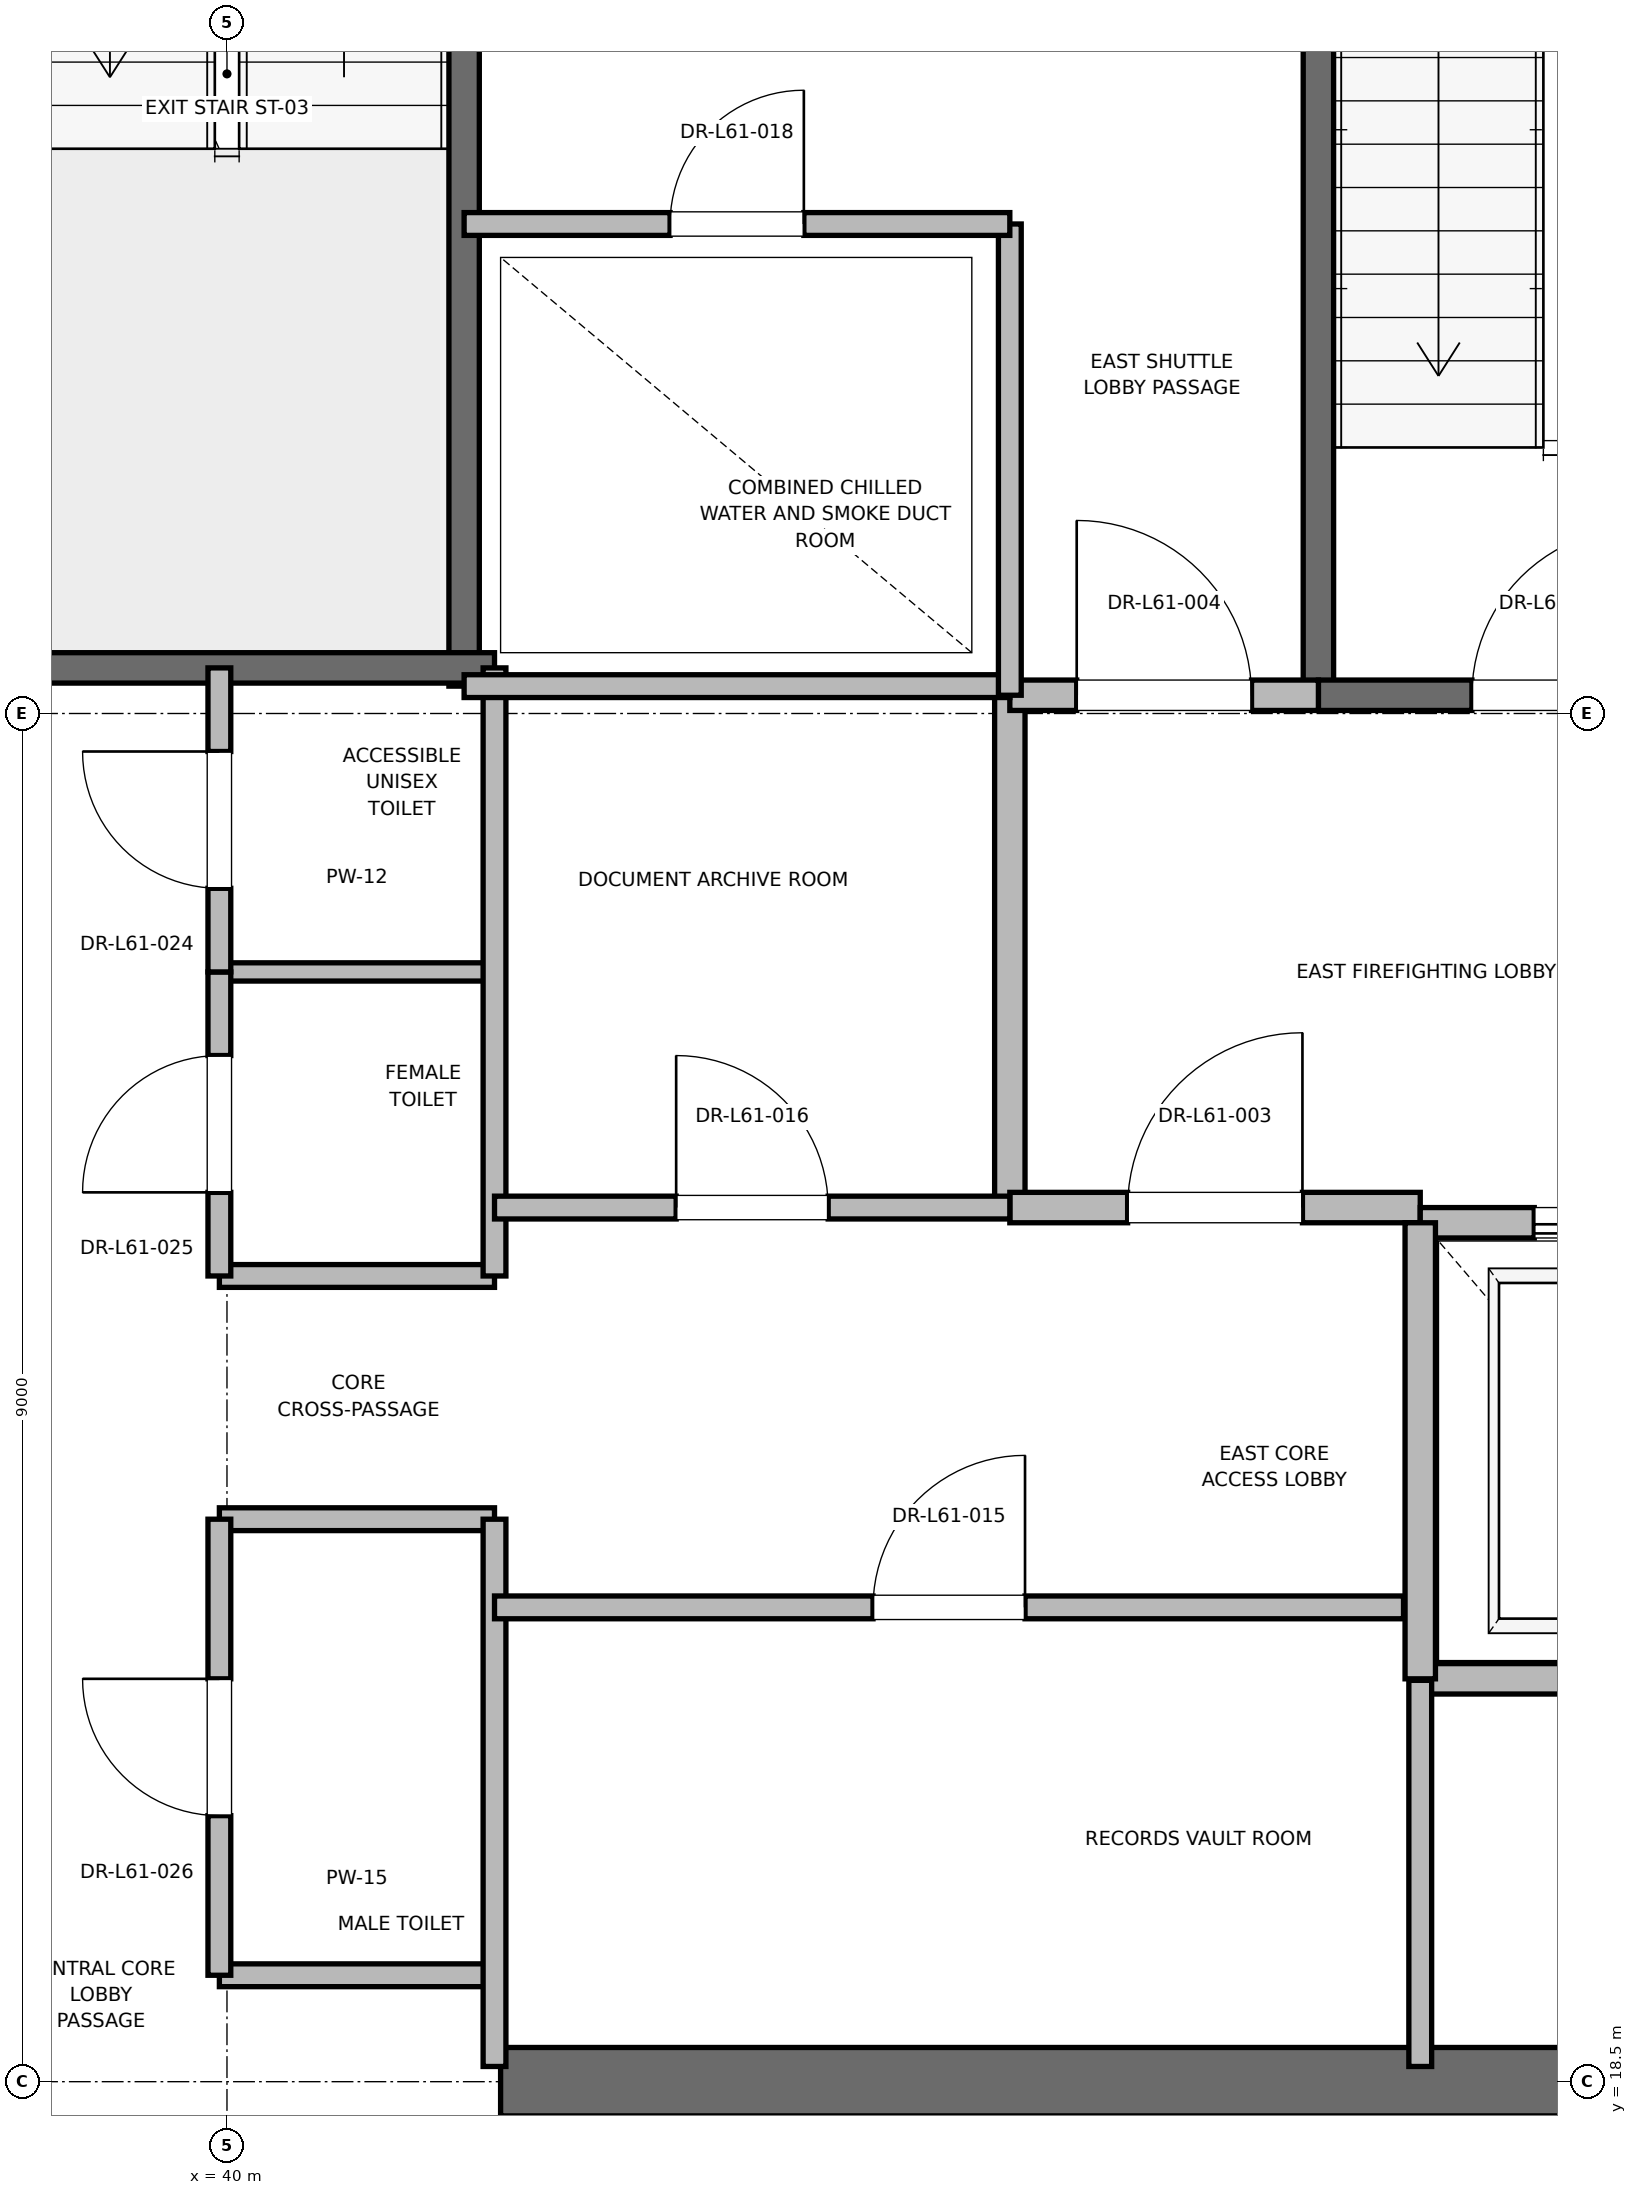
"""IFC4 building model, lengths in metres.
Left out: names, types, materials, properties, quantities, classifications, styles, units other than length and angle.
Written with IfcOpenShell. Run it as: python <this file> out.ifc"""

import sys

from ifc_helpers import new_model, si_unit, direction, frame, frame_2d, origin, place, context, subcontext, project, spatial, rectangle, extrude, element, fill, save


model = new_model("IFC4")
c1 = context("Model", 3, precision=1e-05, world=origin(), true_north=direction((0.0, 1.0)))
c2 = subcontext(c1, "Body", "Model", "MODEL_VIEW")
j1 = project(units=[si_unit("LENGTHUNIT", "METRE"), si_unit("PLANEANGLEUNIT", "RADIAN")], contexts=[c1])
p1 = place(None, origin())
s1 = spatial("IfcSite", under=j1, at=p1, CompositionType="ELEMENT")
p2 = place(p1, origin())
s2 = spatial("IfcBuilding", under=s1, at=p2, CompositionType="ELEMENT")
p3 = place(p2, frame((0.0, 0.0, 263.2)))
s3 = spatial("IfcBuildingStorey", under=s2, at=p3, CompositionType="ELEMENT", Elevation=263.2)
p4 = place(p3, frame((41.8, 18.5, 0.0), z_axis=(0.0, 0.0, 1.0), x_axis=(1.0, 0.0, 0.0)))
e1 = element("IfcWall", 1, at=p4, inside=s3, PredefinedType="SHEAR", context=c2, shape_type="SweptSolid", body=[
    extrude(rectangle(XDim=9.2, YDim=0.45, at=frame_2d((4.6, 0.0))), origin(), (0.0, 0.0, 1.0), 3.785),
])
p5 = place(p3, frame((47.18, 27.62, 0.0), z_axis=(0.0, 0.0, 1.0), x_axis=(0.0, 1.0, 0.0)))
e2 = element("IfcWall", 2, at=p5, inside=s3, PredefinedType="SOLIDWALL", context=c2, shape_type="SweptSolid", body=[
    extrude(rectangle(XDim=8.18, YDim=0.2, at=frame_2d((4.09, 0.0))), origin(), (0.0, 0.0, 1.0), 3.785),
])
p6 = place(p3, frame((47.18, 27.62, 0.0), z_axis=(0.0, 0.0, 1.0), x_axis=(1.0, 0.0, 0.0)))
e3 = element("IfcWall", 3, at=p6, inside=s3, PredefinedType="SOLIDWALL", context=c2, shape_type="SweptSolid", body=[
    extrude(rectangle(XDim=3.12, YDim=0.2, at=frame_2d((1.56, 0.0))), origin(), (0.0, 0.0, 1.0), 3.785),
])
p7 = place(p6, frame((1.01, 0.0, 0.0)))
e4 = element("IfcOpeningElement", 4, at=p7, cuts=e3, PredefinedType="OPENING", context=c2, shape_type="SweptSolid", body=[
    extrude(rectangle(XDim=1.1, YDim=2.15, at=frame_2d((0.55, 1.075))), frame((0.0, 0.1, 0.0), z_axis=(0.0, -1.0, 0.0), x_axis=(1.0, 0.0, 0.0)), (0.0, 0.0, 1.0), 0.2),
])
p8 = place(p3, frame((41.56, 27.68, 0.0), z_axis=(0.0, 0.0, 1.0), x_axis=(0.0, 1.0, 0.0)))
e5 = element("IfcWall", 5, at=p8, inside=s3, PredefinedType="SOLIDWALL", context=c2, shape_type="SweptSolid", body=[
    extrude(rectangle(XDim=8.57, YDim=0.2, at=frame_2d((4.285, 0.0))), origin(), (0.0, 0.0, 1.0), 3.785),
])
p9 = place(p3, frame((38.44, 27.8, 0.0), z_axis=(0.0, 0.0, 1.0), x_axis=(1.0, 0.0, 0.0)))
e6 = element("IfcWall", 6, at=p9, inside=s3, PredefinedType="SOLIDWALL", context=c2, shape_type="SweptSolid", body=[
    extrude(rectangle(XDim=3.32, YDim=0.2, at=frame_2d((1.66, 0.0))), origin(), (0.0, 0.0, 1.0), 3.785),
])
p10 = place(p3, frame((45.15, 24.25, 0.0), z_axis=(0.0, 0.0, 1.0), x_axis=(0.0, 1.0, 0.0)))
e7 = element("IfcWall", 7, at=p10, inside=s3, PredefinedType="PARTITIONING", context=c2, shape_type="SweptSolid", body=[
    extrude(rectangle(XDim=3.37, YDim=0.2, at=frame_2d((1.685, 0.0))), origin(), (0.0, 0.0, 1.0), 3.785),
])
p11 = place(p3, frame((45.15, 24.25, 0.0), z_axis=(0.0, 0.0, 1.0), x_axis=(1.0, 0.0, 0.0)))
e8 = element("IfcWall", 8, at=p11, inside=s3, PredefinedType="PARTITIONING", context=c2, shape_type="SweptSolid", body=[
    extrude(rectangle(XDim=2.7, YDim=0.2, at=frame_2d((1.35, 0.0))), origin(), (0.0, 0.0, 1.0), 3.785),
])
p12 = place(p11, frame((0.775, 0.0, 0.0)))
e9 = element("IfcOpeningElement", 9, at=p12, cuts=e8, PredefinedType="OPENING", context=c2, shape_type="SweptSolid", body=[
    extrude(rectangle(XDim=1.15, YDim=2.2, at=frame_2d((0.575, 1.1))), frame((0.0, 0.1, 0.0), z_axis=(0.0, -1.0, 0.0), x_axis=(1.0, 0.0, 0.0)), (0.0, 0.0, 1.0), 0.2),
])
p13 = place(p3, frame((45.15, 27.62, 0.0), z_axis=(0.0, 0.0, 1.0), x_axis=(1.0, 0.0, 0.0)))
e10 = element("IfcWall", 10, at=p13, inside=s3, PredefinedType="PARTITIONING", context=c2, shape_type="SweptSolid", body=[
    extrude(rectangle(XDim=2.03, YDim=0.2, at=frame_2d((1.015, 0.0))), origin(), (0.0, 0.0, 1.0), 3.785),
])
p14 = place(p13, frame((0.44, 0.0, 0.0)))
e11 = element("IfcOpeningElement", 11, at=p14, cuts=e10, PredefinedType="OPENING", context=c2, shape_type="SweptSolid", body=[
    extrude(rectangle(XDim=1.15, YDim=2.2, at=frame_2d((0.575, 1.1))), frame((0.0, 0.1, 0.0), z_axis=(0.0, -1.0, 0.0), x_axis=(1.0, 0.0, 0.0)), (0.0, 0.0, 1.0), 0.2),
])
p15 = place(p3, frame((47.85, 21.15, 0.0), z_axis=(0.0, 0.0, 1.0), x_axis=(1.0, 0.0, 0.0)))
e12 = element("IfcWall", 12, at=p15, inside=s3, PredefinedType="SOLIDWALL", context=c2, shape_type="SweptSolid", body=[
    extrude(rectangle(XDim=2.6, YDim=0.2, at=frame_2d((1.3, 0.0))), origin(), (0.0, 0.0, 1.0), 3.785),
])
p16 = place(p3, frame((50.45, 24.15, 0.0), z_axis=(0.0, 0.0, 1.0), x_axis=(-1.0, 0.0, 0.0)))
e13 = element("IfcWall", 13, at=p16, inside=s3, PredefinedType="SOLIDWALL", context=c2, shape_type="SweptSolid", body=[
    extrude(rectangle(XDim=2.6, YDim=0.2, at=frame_2d((1.3, 0.0))), origin(), (0.0, 0.0, 1.0), 2.865),
])
p17 = place(p16, frame((0.75, 0.0, 0.0)))
e14 = element("IfcOpeningElement", 14, at=p17, cuts=e13, PredefinedType="OPENING", context=c2, shape_type="SweptSolid", body=[
    extrude(rectangle(XDim=1.1, YDim=2.2, at=frame_2d((0.55, 1.1))), frame((0.0, 0.1, 0.0), z_axis=(0.0, -1.0, 0.0), x_axis=(1.0, 0.0, 0.0)), (0.0, 0.0, 1.0), 0.2),
])
p18 = place(p3, frame((47.85, 24.15, 0.0), z_axis=(0.0, 0.0, 1.0), x_axis=(0.0, -1.0, 0.0)))
e15 = element("IfcWall", 15, at=p18, inside=s3, PredefinedType="SOLIDWALL", context=c2, shape_type="SweptSolid", body=[
    extrude(rectangle(XDim=3.0, YDim=0.2, at=frame_2d((1.5, 0.0))), origin(), (0.0, 0.0, 1.0), 3.785),
])
for number, where, z_axis, x_axis in (
    (16, (39.95, 19.2, 0.0), (0.0, 0.0, 1.0), (1.0, 0.0, 0.0)),
    (17, (39.95, 22.2, 0.0), (0.0, 0.0, 1.0), (1.0, 0.0, 0.0)),
    (18, (39.95, 23.8, 0.0), (0.0, 0.0, 1.0), (1.0, 0.0, 0.0)),
):
    element("IfcWall", number, at=place(p3, frame(where, z_axis=z_axis, x_axis=x_axis)), inside=s3, PredefinedType="PARTITIONING", context=c2, shape_type="SweptSolid", body=[
        extrude(rectangle(XDim=1.81, YDim=0.15, at=frame_2d((0.905, 0.0))), origin(), (0.0, 0.0, 1.0), 2.85),
    ])
p19 = place(p3, frame((39.95, 25.8, 0.0), z_axis=(0.0, 0.0, 1.0), x_axis=(1.0, 0.0, 0.0)))
e19 = element("IfcWall", 19, at=p19, inside=s3, PredefinedType="PARTITIONING", context=c2, shape_type="SweptSolid", body=[
    extrude(rectangle(XDim=1.81, YDim=0.12, at=frame_2d((0.905, 0.0))), origin(), (0.0, 0.0, 1.0), 2.85),
])
p20 = place(p3, frame((41.76, 18.6, 0.0), z_axis=(0.0, 0.0, 1.0), x_axis=(0.0, 1.0, 0.0)))
e20 = element("IfcWall", 20, at=p20, inside=s3, PredefinedType="PARTITIONING", context=c2, shape_type="SweptSolid", body=[
    extrude(rectangle(XDim=3.6, YDim=0.15, at=frame_2d((1.8, 0.0))), origin(), (0.0, 0.0, 1.0), 2.85),
])
p21 = place(p3, frame((41.76, 23.8, 0.0), z_axis=(0.0, 0.0, 1.0), x_axis=(0.0, 1.0, 0.0)))
e21 = element("IfcWall", 21, at=p21, inside=s3, PredefinedType="PARTITIONING", context=c2, shape_type="SweptSolid", body=[
    extrude(rectangle(XDim=4.0, YDim=0.15, at=frame_2d((2.0, 0.0))), origin(), (0.0, 0.0, 1.0), 2.85),
])
p22 = place(p3, frame((39.95, 19.2, 0.0), z_axis=(0.0, 0.0, 1.0), x_axis=(0.0, 1.0, 0.0)))
e22 = element("IfcWall", 22, at=p22, inside=s3, PredefinedType="PARTITIONING", context=c2, shape_type="SweptSolid", body=[
    extrude(rectangle(XDim=3.0, YDim=0.15, at=frame_2d((1.5, 0.0))), origin(), (0.0, 0.0, 1.0), 2.85),
])
p23 = place(p22, frame((1.05, 0.0, 0.0)))
e23 = element("IfcOpeningElement", 23, at=p23, cuts=e22, PredefinedType="OPENING", context=c2, shape_type="SweptSolid", body=[
    extrude(rectangle(XDim=0.9, YDim=2.1, at=frame_2d((0.45, 1.05))), frame((0.0, 0.075, 0.0), z_axis=(0.0, -1.0, 0.0), x_axis=(1.0, 0.0, 0.0)), (0.0, 0.0, 1.0), 0.15),
])
p24 = place(p3, frame((39.95, 23.8, 0.0), z_axis=(0.0, 0.0, 1.0), x_axis=(0.0, 1.0, 0.0)))
e24 = element("IfcWall", 24, at=p24, inside=s3, PredefinedType="PARTITIONING", context=c2, shape_type="SweptSolid", body=[
    extrude(rectangle(XDim=2.0, YDim=0.15, at=frame_2d((1.0, 0.0))), origin(), (0.0, 0.0, 1.0), 2.85),
])
p25 = place(p24, frame((0.55, 0.0, 0.0)))
e25 = element("IfcOpeningElement", 25, at=p25, cuts=e24, PredefinedType="OPENING", context=c2, shape_type="SweptSolid", body=[
    extrude(rectangle(XDim=0.9, YDim=2.1, at=frame_2d((0.45, 1.05))), frame((0.0, 0.075, 0.0), z_axis=(0.0, -1.0, 0.0), x_axis=(1.0, 0.0, 0.0)), (0.0, 0.0, 1.0), 0.15),
])
p26 = place(p3, frame((39.95, 25.8, 0.0), z_axis=(0.0, 0.0, 1.0), x_axis=(0.0, 1.0, 0.0)))
e26 = element("IfcWall", 26, at=p26, inside=s3, PredefinedType="PARTITIONING", context=c2, shape_type="SweptSolid", body=[
    extrude(rectangle(XDim=2.0, YDim=0.15, at=frame_2d((1.0, 0.0))), origin(), (0.0, 0.0, 1.0), 2.85),
])
p27 = place(p26, frame((0.55, 0.0, 0.0)))
e27 = element("IfcOpeningElement", 27, at=p27, cuts=e26, PredefinedType="OPENING", context=c2, shape_type="SweptSolid", body=[
    extrude(rectangle(XDim=0.9, YDim=2.1, at=frame_2d((0.45, 1.05))), frame((0.0, 0.075, 0.0), z_axis=(0.0, -1.0, 0.0), x_axis=(1.0, 0.0, 0.0)), (0.0, 0.0, 1.0), 0.15),
])
p28 = place(p3, frame((41.56, 27.68, 0.0), z_axis=(0.0, 0.0, 1.0), x_axis=(1.0, 0.0, 0.0)))
e28 = element("IfcWall", 28, at=p28, inside=s3, PredefinedType="PARTITIONING", context=c2, shape_type="SweptSolid", body=[
    extrude(rectangle(XDim=3.59, YDim=0.15, at=frame_2d((1.795, 0.0))), origin(), (0.0, 0.0, 1.0), 2.85),
])
p29 = place(p3, frame((47.85, 18.6, 0.0), z_axis=(0.0, 0.0, 1.0), x_axis=(0.0, 1.0, 0.0)))
e29 = element("IfcWall", 29, at=p29, inside=s3, PredefinedType="PARTITIONING", context=c2, shape_type="SweptSolid", body=[
    extrude(rectangle(XDim=2.54, YDim=0.15, at=frame_2d((1.27, 0.0))), origin(), (0.0, 0.0, 1.0), 2.85),
])
p30 = place(p3, frame((41.76, 21.62, 0.0), z_axis=(0.0, 0.0, 1.0), x_axis=(1.0, 0.0, 0.0)))
e30 = element("IfcWall", 30, at=p30, inside=s3, PredefinedType="PARTITIONING", context=c2, shape_type="SweptSolid", body=[
    extrude(rectangle(XDim=5.98, YDim=0.15, at=frame_2d((2.99, 0.0))), origin(), (0.0, 0.0, 1.0), 2.85),
])
p31 = place(p30, frame((2.49, 0.0, 0.0)))
e31 = element("IfcOpeningElement", 31, at=p31, cuts=e30, PredefinedType="OPENING", context=c2, shape_type="SweptSolid", body=[
    extrude(rectangle(XDim=1.0, YDim=2.15, at=frame_2d((0.5, 1.075))), frame((0.0, 0.075, 0.0), z_axis=(0.0, -1.0, 0.0), x_axis=(1.0, 0.0, 0.0)), (0.0, 0.0, 1.0), 0.15),
])
p32 = place(p3, frame((41.76, 24.25, 0.0), z_axis=(0.0, 0.0, 1.0), x_axis=(1.0, 0.0, 0.0)))
e32 = element("IfcWall", 32, at=p32, inside=s3, PredefinedType="PARTITIONING", context=c2, shape_type="SweptSolid", body=[
    extrude(rectangle(XDim=3.39, YDim=0.15, at=frame_2d((1.695, 0.0))), origin(), (0.0, 0.0, 1.0), 2.85),
])
p33 = place(p32, frame((1.195, 0.0, 0.0)))
e33 = element("IfcOpeningElement", 33, at=p33, cuts=e32, PredefinedType="OPENING", context=c2, shape_type="SweptSolid", body=[
    extrude(rectangle(XDim=1.0, YDim=2.15, at=frame_2d((0.5, 1.075))), frame((0.0, 0.075, 0.0), z_axis=(0.0, -1.0, 0.0), x_axis=(1.0, 0.0, 0.0)), (0.0, 0.0, 1.0), 0.15),
])
p34 = place(p3, frame((45.15, 27.62, 0.0), z_axis=(0.0, 0.0, 1.0), x_axis=(0.0, 1.0, 0.0)))
e34 = element("IfcWall", 34, at=p34, inside=s3, PredefinedType="PARTITIONING", context=c2, shape_type="SweptSolid", body=[
    extrude(rectangle(XDim=3.1, YDim=0.15, at=frame_2d((1.55, 0.0))), origin(), (0.0, 0.0, 1.0), 2.85),
])
p35 = place(p3, frame((41.56, 30.72, 0.0), z_axis=(0.0, 0.0, 1.0), x_axis=(1.0, 0.0, 0.0)))
e35 = element("IfcWall", 35, at=p35, inside=s3, PredefinedType="PARTITIONING", context=c2, shape_type="SweptSolid", body=[
    extrude(rectangle(XDim=3.59, YDim=0.15, at=frame_2d((1.795, 0.0))), origin(), (0.0, 0.0, 1.0), 2.85),
])
p36 = place(p35, frame((1.355, 0.0, 0.0)))
e36 = element("IfcOpeningElement", 36, at=p36, cuts=e35, PredefinedType="OPENING", context=c2, shape_type="SweptSolid", body=[
    extrude(rectangle(XDim=0.88, YDim=2.1, at=frame_2d((0.44, 1.05))), frame((0.0, 0.075, 0.0), z_axis=(0.0, -1.0, 0.0), x_axis=(1.0, 0.0, 0.0)), (0.0, 0.0, 1.0), 0.15),
])
p37 = place(p7, origin())
e37 = element("IfcDoor", 37, at=p37, inside=s3, OperationType="SINGLE_SWING_RIGHT", PredefinedType="DOOR", context=c2, shape_type="SweptSolid", body=[
    extrude(rectangle(XDim=1.1, YDim=2.15, at=frame_2d((0.55, 1.075))), frame((0.0, 0.025, 0.0), z_axis=(0.0, -1.0, 0.0), x_axis=(1.0, 0.0, 0.0)), (0.0, 0.0, 1.0), 0.05),
])
fill(e4, e37)
p38 = place(p12, origin())
e38 = element("IfcDoor", 38, at=p38, inside=s3, OperationType="SINGLE_SWING_RIGHT", PredefinedType="DOOR", context=c2, shape_type="SweptSolid", body=[
    extrude(rectangle(XDim=1.15, YDim=2.2, at=frame_2d((0.575, 1.1))), frame((0.0, 0.025, 0.0), z_axis=(0.0, -1.0, 0.0), x_axis=(1.0, 0.0, 0.0)), (0.0, 0.0, 1.0), 0.05),
])
fill(e9, e38)
p39 = place(p14, origin())
e39 = element("IfcDoor", 39, at=p39, inside=s3, OperationType="SINGLE_SWING_LEFT", PredefinedType="DOOR", context=c2, shape_type="SweptSolid", body=[
    extrude(rectangle(XDim=1.15, YDim=2.2, at=frame_2d((0.575, 1.1))), frame((0.0, 0.025, 0.0), z_axis=(0.0, -1.0, 0.0), x_axis=(1.0, 0.0, 0.0)), (0.0, 0.0, 1.0), 0.05),
])
fill(e11, e39)
p40 = place(p17, origin())
e40 = element("IfcDoor", 40, at=p40, inside=s3, OperationType="SLIDING_TO_RIGHT", PredefinedType="DOOR", context=c2, shape_type="SweptSolid", body=[
    extrude(rectangle(XDim=1.1, YDim=2.2, at=frame_2d((0.55, 1.1))), frame((0.0, 0.025, 0.0), z_axis=(0.0, -1.0, 0.0), x_axis=(1.0, 0.0, 0.0)), (0.0, 0.0, 1.0), 0.05),
])
fill(e14, e40)
p41 = place(p23, origin())
e41 = element("IfcDoor", 41, at=p41, inside=s3, OperationType="SINGLE_SWING_RIGHT", PredefinedType="DOOR", context=c2, shape_type="SweptSolid", body=[
    extrude(rectangle(XDim=0.9, YDim=2.1, at=frame_2d((0.45, 1.05))), frame((0.0, 0.025, 0.0), z_axis=(0.0, -1.0, 0.0), x_axis=(1.0, 0.0, 0.0)), (0.0, 0.0, 1.0), 0.05),
])
fill(e23, e41)
p42 = place(p25, origin())
e42 = element("IfcDoor", 42, at=p42, inside=s3, OperationType="SINGLE_SWING_LEFT", PredefinedType="DOOR", context=c2, shape_type="SweptSolid", body=[
    extrude(rectangle(XDim=0.9, YDim=2.1, at=frame_2d((0.45, 1.05))), frame((0.0, 0.025, 0.0), z_axis=(0.0, -1.0, 0.0), x_axis=(1.0, 0.0, 0.0)), (0.0, 0.0, 1.0), 0.05),
])
fill(e25, e42)
p43 = place(p27, origin())
e43 = element("IfcDoor", 43, at=p43, inside=s3, OperationType="SINGLE_SWING_RIGHT", PredefinedType="DOOR", context=c2, shape_type="SweptSolid", body=[
    extrude(rectangle(XDim=0.9, YDim=2.1, at=frame_2d((0.45, 1.05))), frame((0.0, 0.025, 0.0), z_axis=(0.0, -1.0, 0.0), x_axis=(1.0, 0.0, 0.0)), (0.0, 0.0, 1.0), 0.05),
])
fill(e27, e43)
p44 = place(p31, origin())
e44 = element("IfcDoor", 44, at=p44, inside=s3, OperationType="SINGLE_SWING_RIGHT", PredefinedType="DOOR", context=c2, shape_type="SweptSolid", body=[
    extrude(rectangle(XDim=1.0, YDim=2.15, at=frame_2d((0.5, 1.075))), frame((0.0, 0.025, 0.0), z_axis=(0.0, -1.0, 0.0), x_axis=(1.0, 0.0, 0.0)), (0.0, 0.0, 1.0), 0.05),
])
fill(e31, e44)
p45 = place(p33, origin())
e45 = element("IfcDoor", 45, at=p45, inside=s3, OperationType="SINGLE_SWING_LEFT", PredefinedType="DOOR", context=c2, shape_type="SweptSolid", body=[
    extrude(rectangle(XDim=1.0, YDim=2.15, at=frame_2d((0.5, 1.075))), frame((0.0, 0.025, 0.0), z_axis=(0.0, -1.0, 0.0), x_axis=(1.0, 0.0, 0.0)), (0.0, 0.0, 1.0), 0.05),
])
fill(e33, e45)
p46 = place(p36, origin())
e46 = element("IfcDoor", 46, at=p46, inside=s3, OperationType="SINGLE_SWING_RIGHT", PredefinedType="DOOR", context=c2, shape_type="SweptSolid", body=[
    extrude(rectangle(XDim=0.88, YDim=2.1, at=frame_2d((0.44, 1.05))), frame((0.0, 0.025, 0.0), z_axis=(0.0, -1.0, 0.0), x_axis=(1.0, 0.0, 0.0)), (0.0, 0.0, 1.0), 0.05),
])
fill(e36, e46)
save(model, sys.argv[1])
